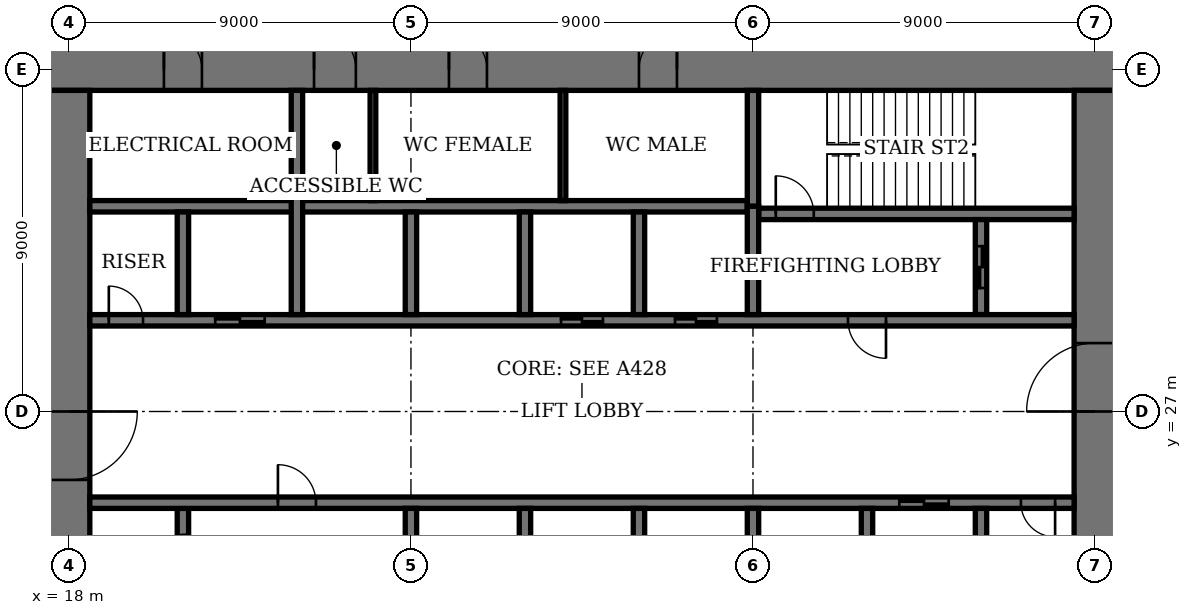
"""IFC4 building model, lengths in metres.
Left out: names, types, materials, properties, quantities, classifications, styles, units other than length and angle.
Written with IfcOpenShell. Run it as: python <this file> out.ifc"""

import sys

from ifc_helpers import new_model, si_unit, direction, frame, frame_2d, origin, place, context, subcontext, project, spatial, rectangle, extrude, element, fill, save


model = new_model("IFC4")
c1 = context("Model", 3, precision=1e-05, world=origin(), true_north=direction((0.0, 1.0)))
c2 = subcontext(c1, "Body", "Model", "MODEL_VIEW")
j1 = project(units=[si_unit("LENGTHUNIT", "METRE"), si_unit("PLANEANGLEUNIT", "RADIAN")], contexts=[c1])
p1 = place(None, origin())
s1 = spatial("IfcSite", under=j1, at=p1, CompositionType="ELEMENT")
p2 = place(p1, origin())
s2 = spatial("IfcBuilding", under=s1, at=p2, CompositionType="ELEMENT")
p3 = place(p2, frame((0.0, 0.0, 101.0)))
s3 = spatial("IfcBuildingStorey", under=s2, at=p3, CompositionType="ELEMENT", Elevation=101.0)
p4 = place(p3, frame((45.55, 36.0, 0.0), z_axis=(0.0, 0.0, 1.0), x_axis=(-1.0, 0.0, 0.0)))
e1 = element("IfcWall", 1, at=p4, inside=s3, PredefinedType="SHEAR", context=c2, shape_type="SweptSolid", body=[
    extrude(rectangle(XDim=28.1, YDim=1.1, at=frame_2d((14.05, 0.0))), origin(), (0.0, 0.0, 1.0), 4.0),
])
p5 = place(p4, frame((11.55, 0.0, 0.0)))
e2 = element("IfcOpeningElement", 2, at=p5, cuts=e1, PredefinedType="OPENING", context=c2, shape_type="SweptSolid", body=[
    extrude(rectangle(XDim=1.0, YDim=2.4, at=frame_2d((0.5, 1.2))), frame((0.0, 0.56, 0.0), z_axis=(0.0, -1.0, 0.0), x_axis=(1.0, 0.0, 0.0)), (0.0, 0.0, 1.0), 1.12),
])
p6 = place(p4, frame((16.55, 0.0, 0.0)))
e3 = element("IfcOpeningElement", 3, at=p6, cuts=e1, PredefinedType="OPENING", context=c2, shape_type="SweptSolid", body=[
    extrude(rectangle(XDim=1.0, YDim=2.4, at=frame_2d((0.5, 1.2))), frame((0.0, 0.56, 0.0), z_axis=(0.0, -1.0, 0.0), x_axis=(1.0, 0.0, 0.0)), (0.0, 0.0, 1.0), 1.12),
])
p7 = place(p4, frame((20.0, 0.0, 0.0)))
e4 = element("IfcOpeningElement", 4, at=p7, cuts=e1, PredefinedType="OPENING", context=c2, shape_type="SweptSolid", body=[
    extrude(rectangle(XDim=1.1, YDim=2.4, at=frame_2d((0.55, 1.2))), frame((0.0, 0.56, 0.0), z_axis=(0.0, -1.0, 0.0), x_axis=(1.0, 0.0, 0.0)), (0.0, 0.0, 1.0), 1.12),
])
p8 = place(p4, frame((24.05, 0.0, 0.0)))
e5 = element("IfcOpeningElement", 5, at=p8, cuts=e1, PredefinedType="OPENING", context=c2, shape_type="SweptSolid", body=[
    extrude(rectangle(XDim=1.0, YDim=2.4, at=frame_2d((0.5, 1.2))), frame((0.0, 0.56, 0.0), z_axis=(0.0, -1.0, 0.0), x_axis=(1.0, 0.0, 0.0)), (0.0, 0.0, 1.0), 1.12),
])
p9 = place(p3, frame((18.0, 35.45, 0.0), z_axis=(0.0, 0.0, 1.0), x_axis=(0.0, -1.0, 0.0)))
e6 = element("IfcWall", 6, at=p9, inside=s3, PredefinedType="SHEAR", context=c2, shape_type="SweptSolid", body=[
    extrude(rectangle(XDim=16.9, YDim=1.1, at=frame_2d((8.45, 0.0))), origin(), (0.0, 0.0, 1.0), 4.0),
])
p10 = place(p9, frame((8.45, 0.0, 0.0)))
e7 = element("IfcOpeningElement", 7, at=p10, cuts=e6, PredefinedType="OPENING", context=c2, shape_type="SweptSolid", body=[
    extrude(rectangle(XDim=1.8, YDim=2.4, at=frame_2d((0.9, 1.2))), frame((0.0, 0.56, 0.0), z_axis=(0.0, -1.0, 0.0), x_axis=(1.0, 0.0, 0.0)), (0.0, 0.0, 1.0), 1.12),
])
p11 = place(p3, frame((45.0, 18.55, 0.0), z_axis=(0.0, 0.0, 1.0), x_axis=(0.0, 1.0, 0.0)))
e8 = element("IfcWall", 8, at=p11, inside=s3, PredefinedType="SHEAR", context=c2, shape_type="SweptSolid", body=[
    extrude(rectangle(XDim=16.9, YDim=1.1, at=frame_2d((8.45, 0.0))), origin(), (0.0, 0.0, 1.0), 4.0),
])
p12 = place(p11, frame((8.45, 0.0, 0.0)))
e9 = element("IfcOpeningElement", 9, at=p12, cuts=e8, PredefinedType="OPENING", context=c2, shape_type="SweptSolid", body=[
    extrude(rectangle(XDim=1.8, YDim=2.4, at=frame_2d((0.9, 1.2))), frame((0.0, 0.56, 0.0), z_axis=(0.0, -1.0, 0.0), x_axis=(1.0, 0.0, 0.0)), (0.0, 0.0, 1.0), 1.12),
])
p13 = place(p3, frame((36.15, 32.2, 0.0), z_axis=(0.0, 0.0, 1.0), x_axis=(1.0, 0.0, 0.0)))
e10 = element("IfcWall", 10, at=p13, inside=s3, PredefinedType="SHEAR", context=c2, shape_type="SweptSolid", body=[
    extrude(rectangle(XDim=8.3, YDim=0.3, at=frame_2d((4.15, 0.0))), origin(), (0.0, 0.0, 1.0), 4.0),
])
p14 = place(p13, frame((0.45, 0.0, 0.0)))
e11 = element("IfcOpeningElement", 11, at=p14, cuts=e10, PredefinedType="OPENING", context=c2, shape_type="SweptSolid", body=[
    extrude(rectangle(XDim=1.0, YDim=2.4, at=frame_2d((0.5, 1.2))), frame((0.0, 0.16, 0.0), z_axis=(0.0, -1.0, 0.0), x_axis=(1.0, 0.0, 0.0)), (0.0, 0.0, 1.0), 0.32),
])
p15 = place(p3, frame((36.0, 32.4, 0.0), z_axis=(0.0, 0.0, 1.0), x_axis=(0.0, 1.0, 0.0)))
e12 = element("IfcWall", 12, at=p15, inside=s3, PredefinedType="SHEAR", context=c2, shape_type="SweptSolid", body=[
    extrude(rectangle(XDim=3.05, YDim=0.3, at=frame_2d((1.525, 0.0))), origin(), (0.0, 0.0, 1.0), 4.0),
])
p16 = place(p3, frame((21.0, 21.95, 0.0), z_axis=(0.0, 0.0, 1.0), x_axis=(0.0, 1.0, 0.0)))
e13 = element("IfcWall", 13, at=p16, inside=s3, PredefinedType="SHEAR", context=c2, shape_type="SweptSolid", body=[
    extrude(rectangle(XDim=2.5, YDim=0.3, at=frame_2d((1.25, 0.0))), origin(), (0.0, 0.0, 1.0), 4.0),
])
p17 = place(p16, frame((0.7, 0.0, 0.0)))
e14 = element("IfcOpeningElement", 14, at=p17, cuts=e13, PredefinedType="OPENING", context=c2, shape_type="SweptSolid", body=[
    extrude(rectangle(XDim=1.1, YDim=2.4, at=frame_2d((0.55, 1.2))), frame((0.0, 0.16, 0.0), z_axis=(0.0, -1.0, 0.0), x_axis=(1.0, 0.0, 0.0)), (0.0, 0.0, 1.0), 0.32),
])
p18 = place(p3, frame((42.0, 29.55, 0.0), z_axis=(0.0, 0.0, 1.0), x_axis=(0.0, 1.0, 0.0)))
e15 = element("IfcWall", 15, at=p18, inside=s3, PredefinedType="SHEAR", context=c2, shape_type="SweptSolid", body=[
    extrude(rectangle(XDim=2.5, YDim=0.3, at=frame_2d((1.25, 0.0))), origin(), (0.0, 0.0, 1.0), 4.0),
])
p19 = place(p18, frame((0.7, 0.0, 0.0)))
e16 = element("IfcOpeningElement", 16, at=p19, cuts=e15, PredefinedType="OPENING", context=c2, shape_type="SweptSolid", body=[
    extrude(rectangle(XDim=1.1, YDim=2.4, at=frame_2d((0.55, 1.2))), frame((0.0, 0.16, 0.0), z_axis=(0.0, -1.0, 0.0), x_axis=(1.0, 0.0, 0.0)), (0.0, 0.0, 1.0), 0.32),
])
p20 = place(p3, frame((18.55, 24.6, 0.0), z_axis=(0.0, 0.0, 1.0), x_axis=(1.0, 0.0, 0.0)))
e17 = element("IfcWall", 17, at=p20, inside=s3, PredefinedType="SHEAR", context=c2, shape_type="SweptSolid", body=[
    extrude(rectangle(XDim=25.9, YDim=0.3, at=frame_2d((12.95, 0.0))), origin(), (0.0, 0.0, 1.0), 4.0),
])
p21 = place(p20, frame((4.95, 0.0, 0.0)))
e18 = element("IfcOpeningElement", 18, at=p21, cuts=e17, PredefinedType="OPENING", context=c2, shape_type="SweptSolid", body=[
    extrude(rectangle(XDim=1.0, YDim=2.4, at=frame_2d((0.5, 1.2))), frame((0.0, 0.16, 0.0), z_axis=(0.0, -1.0, 0.0), x_axis=(1.0, 0.0, 0.0)), (0.0, 0.0, 1.0), 0.32),
])
p22 = place(p20, frame((24.5, 0.0, 0.0)))
e19 = element("IfcOpeningElement", 19, at=p22, cuts=e17, PredefinedType="OPENING", context=c2, shape_type="SweptSolid", body=[
    extrude(rectangle(XDim=0.9, YDim=2.1, at=frame_2d((0.45, 1.05))), frame((0.0, 0.16, 0.0), z_axis=(0.0, -1.0, 0.0), x_axis=(1.0, 0.0, 0.0)), (0.0, 0.0, 1.0), 0.32),
])
p23 = place(p20, frame((21.3, 0.0, 0.0)))
e20 = element("IfcOpeningElement", 20, at=p23, cuts=e17, PredefinedType="OPENING", context=c2, shape_type="SweptSolid", body=[
    extrude(rectangle(XDim=1.3, YDim=2.4, at=frame_2d((0.65, 1.2))), frame((0.0, 0.16, 0.0), z_axis=(0.0, -1.0, 0.0), x_axis=(1.0, 0.0, 0.0)), (0.0, 0.0, 1.0), 0.32),
])
p24 = place(p3, frame((18.55, 29.4, 0.0), z_axis=(0.0, 0.0, 1.0), x_axis=(1.0, 0.0, 0.0)))
e21 = element("IfcWall", 21, at=p24, inside=s3, PredefinedType="SHEAR", context=c2, shape_type="SweptSolid", body=[
    extrude(rectangle(XDim=25.9, YDim=0.3, at=frame_2d((12.95, 0.0))), origin(), (0.0, 0.0, 1.0), 4.0),
])
p25 = place(p24, frame((19.95, 0.0, 0.0)))
e22 = element("IfcOpeningElement", 22, at=p25, cuts=e21, PredefinedType="OPENING", context=c2, shape_type="SweptSolid", body=[
    extrude(rectangle(XDim=1.0, YDim=2.4, at=frame_2d((0.5, 1.2))), frame((0.0, 0.16, 0.0), z_axis=(0.0, -1.0, 0.0), x_axis=(1.0, 0.0, 0.0)), (0.0, 0.0, 1.0), 0.32),
])
p26 = place(p24, frame((0.5, 0.0, 0.0)))
e23 = element("IfcOpeningElement", 23, at=p26, cuts=e21, PredefinedType="OPENING", context=c2, shape_type="SweptSolid", body=[
    extrude(rectangle(XDim=0.9, YDim=2.1, at=frame_2d((0.45, 1.05))), frame((0.0, 0.16, 0.0), z_axis=(0.0, -1.0, 0.0), x_axis=(1.0, 0.0, 0.0)), (0.0, 0.0, 1.0), 0.32),
])
p27 = place(p24, frame((15.4, 0.0, 0.0)))
e24 = element("IfcOpeningElement", 24, at=p27, cuts=e21, PredefinedType="OPENING", context=c2, shape_type="SweptSolid", body=[
    extrude(rectangle(XDim=1.1, YDim=2.4, at=frame_2d((0.55, 1.2))), frame((0.0, 0.16, 0.0), z_axis=(0.0, -1.0, 0.0), x_axis=(1.0, 0.0, 0.0)), (0.0, 0.0, 1.0), 0.32),
])
p28 = place(p24, frame((12.4, 0.0, 0.0)))
e25 = element("IfcOpeningElement", 25, at=p28, cuts=e21, PredefinedType="OPENING", context=c2, shape_type="SweptSolid", body=[
    extrude(rectangle(XDim=1.1, YDim=2.4, at=frame_2d((0.55, 1.2))), frame((0.0, 0.16, 0.0), z_axis=(0.0, -1.0, 0.0), x_axis=(1.0, 0.0, 0.0)), (0.0, 0.0, 1.0), 0.32),
])
p29 = place(p24, frame((3.3, 0.0, 0.0)))
e26 = element("IfcOpeningElement", 26, at=p29, cuts=e21, PredefinedType="OPENING", context=c2, shape_type="SweptSolid", body=[
    extrude(rectangle(XDim=1.3, YDim=2.4, at=frame_2d((0.65, 1.2))), frame((0.0, 0.16, 0.0), z_axis=(0.0, -1.0, 0.0), x_axis=(1.0, 0.0, 0.0)), (0.0, 0.0, 1.0), 0.32),
])
p30 = place(p3, frame((18.55, 32.4, 0.0), z_axis=(0.0, 0.0, 1.0), x_axis=(1.0, 0.0, 0.0)))
e27 = element("IfcWall", 27, at=p30, inside=s3, PredefinedType="SHEAR", context=c2, shape_type="SweptSolid", body=[
    extrude(rectangle(XDim=17.3, YDim=0.3, at=frame_2d((8.65, 0.0))), origin(), (0.0, 0.0, 1.0), 4.0),
])
for number, where, z_axis, x_axis in (
    (28, (30.0, 21.75, 0.0), (0.0, 0.0, 1.0), (0.0, 1.0, 0.0)),
    (29, (33.0, 29.55, 0.0), (0.0, 0.0, 1.0), (0.0, 1.0, 0.0)),
    (30, (33.0, 21.75, 0.0), (0.0, 0.0, 1.0), (0.0, 1.0, 0.0)),
    (31, (30.0, 29.55, 0.0), (0.0, 0.0, 1.0), (0.0, 1.0, 0.0)),
    (32, (36.0, 21.75, 0.0), (0.0, 0.0, 1.0), (0.0, 1.0, 0.0)),
    (33, (27.0, 29.55, 0.0), (0.0, 0.0, 1.0), (0.0, 1.0, 0.0)),
):
    element("IfcWall", number, at=place(p3, frame(where, z_axis=z_axis, x_axis=x_axis)), inside=s3, PredefinedType="SHEAR", context=c2, shape_type="SweptSolid", body=[
        extrude(rectangle(XDim=2.7, YDim=0.3, at=frame_2d((1.35, 0.0))), origin(), (0.0, 0.0, 1.0), 4.0),
    ])
for number, where, z_axis, x_axis in (
    (34, (39.0, 18.55, 0.0), (0.0, 0.0, 1.0), (0.0, 1.0, 0.0)),
    (35, (24.0, 29.55, 0.0), (0.0, 0.0, 1.0), (0.0, 1.0, 0.0)),
):
    element("IfcWall", number, at=place(p3, frame(where, z_axis=z_axis, x_axis=x_axis)), inside=s3, PredefinedType="SHEAR", context=c2, shape_type="SweptSolid", body=[
        extrude(rectangle(XDim=5.9, YDim=0.3, at=frame_2d((2.95, 0.0))), origin(), (0.0, 0.0, 1.0), 4.0),
    ])
for number, where, z_axis, x_axis in (
    (36, (42.0, 21.75, 0.0), (0.0, 0.0, 1.0), (0.0, 1.0, 0.0)),
    (37, (21.0, 29.55, 0.0), (0.0, 0.0, 1.0), (0.0, 1.0, 0.0)),
):
    element("IfcWall", number, at=place(p3, frame(where, z_axis=z_axis, x_axis=x_axis)), inside=s3, PredefinedType="SHEAR", context=c2, shape_type="SweptSolid", body=[
        extrude(rectangle(XDim=2.7, YDim=0.3, at=frame_2d((1.35, 0.0))), origin(), (0.0, 0.0, 1.0), 4.0),
    ])
for number, where, z_axis, x_axis in (
    (38, (27.0, 21.6, 0.0), (0.0, 0.0, 1.0), (0.0, 1.0, 0.0)),
    (39, (36.0, 29.55, 0.0), (0.0, 0.0, 1.0), (0.0, 1.0, 0.0)),
):
    element("IfcWall", number, at=place(p3, frame(where, z_axis=z_axis, x_axis=x_axis)), inside=s3, PredefinedType="SHEAR", context=c2, shape_type="SweptSolid", body=[
        extrude(rectangle(XDim=2.85, YDim=0.3, at=frame_2d((1.425, 0.0))), origin(), (0.0, 0.0, 1.0), 4.0),
    ])
for number, where, z_axis, x_axis in (
    (40, (31.0, 32.55, 0.0), (0.0, 0.0, 1.0), (0.0, 1.0, 0.0)),
    (41, (26.0, 32.55, 0.0), (0.0, 0.0, 1.0), (0.0, 1.0, 0.0)),
):
    element("IfcWall", number, at=place(p3, frame(where, z_axis=z_axis, x_axis=x_axis)), inside=s3, PredefinedType="PARTITIONING", context=c2, shape_type="SweptSolid", body=[
        extrude(rectangle(XDim=2.9, YDim=0.15, at=frame_2d((1.45, 0.0))), origin(), (0.0, 0.0, 1.0), 3.75),
    ])
p31 = place(p10, origin())
e42 = element("IfcDoor", 42, at=p31, inside=s3, OperationType="DOUBLE_DOOR_DOUBLE_SWING", PredefinedType="DOOR", context=c2, shape_type="SweptSolid", body=[
    extrude(rectangle(XDim=1.8, YDim=2.4, at=frame_2d((0.9, 1.2))), frame((0.0, 0.03, 0.0), z_axis=(0.0, -1.0, 0.0), x_axis=(1.0, 0.0, 0.0)), (0.0, 0.0, 1.0), 0.06),
    extrude(rectangle(XDim=0.04, YDim=2.4, at=frame_2d((0.02, 1.2))), frame((0.0, 0.55, 0.0), z_axis=(0.0, -1.0, 0.0), x_axis=(1.0, 0.0, 0.0)), (0.0, 0.0, 1.0), 1.1),
    extrude(rectangle(XDim=0.04, YDim=2.4, at=frame_2d((1.78, 1.2))), frame((0.0, 0.55, 0.0), z_axis=(0.0, -1.0, 0.0), x_axis=(1.0, 0.0, 0.0)), (0.0, 0.0, 1.0), 1.1),
    extrude(rectangle(XDim=1.8, YDim=0.04, at=frame_2d((0.9, 2.38))), frame((0.0, 0.55, 0.0), z_axis=(0.0, -1.0, 0.0), x_axis=(1.0, 0.0, 0.0)), (0.0, 0.0, 1.0), 1.1),
])
fill(e7, e42)
p32 = place(p12, origin())
e43 = element("IfcDoor", 43, at=p32, inside=s3, OperationType="DOUBLE_DOOR_DOUBLE_SWING", PredefinedType="DOOR", context=c2, shape_type="SweptSolid", body=[
    extrude(rectangle(XDim=1.8, YDim=2.4, at=frame_2d((0.9, 1.2))), frame((0.0, 0.03, 0.0), z_axis=(0.0, -1.0, 0.0), x_axis=(1.0, 0.0, 0.0)), (0.0, 0.0, 1.0), 0.06),
    extrude(rectangle(XDim=0.04, YDim=2.4, at=frame_2d((0.02, 1.2))), frame((0.0, 0.55, 0.0), z_axis=(0.0, -1.0, 0.0), x_axis=(1.0, 0.0, 0.0)), (0.0, 0.0, 1.0), 1.1),
    extrude(rectangle(XDim=0.04, YDim=2.4, at=frame_2d((1.78, 1.2))), frame((0.0, 0.55, 0.0), z_axis=(0.0, -1.0, 0.0), x_axis=(1.0, 0.0, 0.0)), (0.0, 0.0, 1.0), 1.1),
    extrude(rectangle(XDim=1.8, YDim=0.04, at=frame_2d((0.9, 2.38))), frame((0.0, 0.55, 0.0), z_axis=(0.0, -1.0, 0.0), x_axis=(1.0, 0.0, 0.0)), (0.0, 0.0, 1.0), 1.1),
])
fill(e9, e43)
p33 = place(p5, origin())
e44 = element("IfcDoor", 44, at=p33, inside=s3, OperationType="SINGLE_SWING_LEFT", PredefinedType="DOOR", context=c2, shape_type="SweptSolid", body=[
    extrude(rectangle(XDim=1.0, YDim=2.4, at=frame_2d((0.5, 1.2))), frame((0.0, 0.025, 0.0), z_axis=(0.0, -1.0, 0.0), x_axis=(1.0, 0.0, 0.0)), (0.0, 0.0, 1.0), 0.05),
    extrude(rectangle(XDim=0.04, YDim=2.4, at=frame_2d((0.02, 1.2))), frame((0.0, 0.4, 0.0), z_axis=(0.0, -1.0, 0.0), x_axis=(1.0, 0.0, 0.0)), (0.0, 0.0, 1.0), 0.8),
    extrude(rectangle(XDim=0.04, YDim=2.4, at=frame_2d((0.98, 1.2))), frame((0.0, 0.4, 0.0), z_axis=(0.0, -1.0, 0.0), x_axis=(1.0, 0.0, 0.0)), (0.0, 0.0, 1.0), 0.8),
    extrude(rectangle(XDim=1.0, YDim=0.04, at=frame_2d((0.5, 2.38))), frame((0.0, 0.4, 0.0), z_axis=(0.0, -1.0, 0.0), x_axis=(1.0, 0.0, 0.0)), (0.0, 0.0, 1.0), 0.8),
])
fill(e2, e44)
p34 = place(p6, origin())
e45 = element("IfcDoor", 45, at=p34, inside=s3, OperationType="SINGLE_SWING_RIGHT", PredefinedType="DOOR", context=c2, shape_type="SweptSolid", body=[
    extrude(rectangle(XDim=1.0, YDim=2.4, at=frame_2d((0.5, 1.2))), frame((0.0, 0.025, 0.0), z_axis=(0.0, -1.0, 0.0), x_axis=(1.0, 0.0, 0.0)), (0.0, 0.0, 1.0), 0.05),
    extrude(rectangle(XDim=0.04, YDim=2.4, at=frame_2d((0.02, 1.2))), frame((0.0, 0.4, 0.0), z_axis=(0.0, -1.0, 0.0), x_axis=(1.0, 0.0, 0.0)), (0.0, 0.0, 1.0), 0.8),
    extrude(rectangle(XDim=0.04, YDim=2.4, at=frame_2d((0.98, 1.2))), frame((0.0, 0.4, 0.0), z_axis=(0.0, -1.0, 0.0), x_axis=(1.0, 0.0, 0.0)), (0.0, 0.0, 1.0), 0.8),
    extrude(rectangle(XDim=1.0, YDim=0.04, at=frame_2d((0.5, 2.38))), frame((0.0, 0.4, 0.0), z_axis=(0.0, -1.0, 0.0), x_axis=(1.0, 0.0, 0.0)), (0.0, 0.0, 1.0), 0.8),
])
fill(e3, e45)
p35 = place(p7, origin())
e46 = element("IfcDoor", 46, at=p35, inside=s3, OperationType="SINGLE_SWING_RIGHT", PredefinedType="DOOR", context=c2, shape_type="SweptSolid", body=[
    extrude(rectangle(XDim=1.1, YDim=2.4, at=frame_2d((0.55, 1.2))), frame((0.0, 0.025, 0.0), z_axis=(0.0, -1.0, 0.0), x_axis=(1.0, 0.0, 0.0)), (0.0, 0.0, 1.0), 0.05),
    extrude(rectangle(XDim=0.04, YDim=2.4, at=frame_2d((0.02, 1.2))), frame((0.0, 0.44, 0.0), z_axis=(0.0, -1.0, 0.0), x_axis=(1.0, 0.0, 0.0)), (0.0, 0.0, 1.0), 0.88),
    extrude(rectangle(XDim=0.04, YDim=2.4, at=frame_2d((1.08, 1.2))), frame((0.0, 0.44, 0.0), z_axis=(0.0, -1.0, 0.0), x_axis=(1.0, 0.0, 0.0)), (0.0, 0.0, 1.0), 0.88),
    extrude(rectangle(XDim=1.1, YDim=0.04, at=frame_2d((0.55, 2.38))), frame((0.0, 0.44, 0.0), z_axis=(0.0, -1.0, 0.0), x_axis=(1.0, 0.0, 0.0)), (0.0, 0.0, 1.0), 0.88),
])
fill(e4, e46)
p36 = place(p8, origin())
e47 = element("IfcDoor", 47, at=p36, inside=s3, OperationType="SINGLE_SWING_RIGHT", PredefinedType="DOOR", context=c2, shape_type="SweptSolid", body=[
    extrude(rectangle(XDim=1.0, YDim=2.4, at=frame_2d((0.5, 1.2))), frame((0.0, 0.025, 0.0), z_axis=(0.0, -1.0, 0.0), x_axis=(1.0, 0.0, 0.0)), (0.0, 0.0, 1.0), 0.05),
    extrude(rectangle(XDim=0.04, YDim=2.4, at=frame_2d((0.02, 1.2))), frame((0.0, 0.4, 0.0), z_axis=(0.0, -1.0, 0.0), x_axis=(1.0, 0.0, 0.0)), (0.0, 0.0, 1.0), 0.8),
    extrude(rectangle(XDim=0.04, YDim=2.4, at=frame_2d((0.98, 1.2))), frame((0.0, 0.4, 0.0), z_axis=(0.0, -1.0, 0.0), x_axis=(1.0, 0.0, 0.0)), (0.0, 0.0, 1.0), 0.8),
    extrude(rectangle(XDim=1.0, YDim=0.04, at=frame_2d((0.5, 2.38))), frame((0.0, 0.4, 0.0), z_axis=(0.0, -1.0, 0.0), x_axis=(1.0, 0.0, 0.0)), (0.0, 0.0, 1.0), 0.8),
])
fill(e5, e47)
p37 = place(p14, origin())
e48 = element("IfcDoor", 48, at=p37, inside=s3, OperationType="SINGLE_SWING_RIGHT", PredefinedType="DOOR", context=c2, shape_type="SweptSolid", body=[
    extrude(rectangle(XDim=1.0, YDim=2.4, at=frame_2d((0.5, 1.2))), frame((0.0, 0.03, 0.0), z_axis=(0.0, -1.0, 0.0), x_axis=(1.0, 0.0, 0.0)), (0.0, 0.0, 1.0), 0.06),
])
fill(e11, e48)
p38 = place(p21, origin())
e49 = element("IfcDoor", 49, at=p38, inside=s3, OperationType="SINGLE_SWING_RIGHT", PredefinedType="DOOR", context=c2, shape_type="SweptSolid", body=[
    extrude(rectangle(XDim=1.0, YDim=2.4, at=frame_2d((0.5, 1.2))), frame((0.0, 0.03, 0.0), z_axis=(0.0, -1.0, 0.0), x_axis=(1.0, 0.0, 0.0)), (0.0, 0.0, 1.0), 0.06),
])
fill(e18, e49)
p39 = place(p25, origin())
e50 = element("IfcDoor", 50, at=p39, inside=s3, OperationType="SINGLE_SWING_RIGHT", PredefinedType="DOOR", context=c2, shape_type="SweptSolid", body=[
    extrude(rectangle(XDim=1.0, YDim=2.4, at=frame_2d((0.5, 1.2))), frame((0.0, 0.03, 0.0), z_axis=(0.0, -1.0, 0.0), x_axis=(1.0, 0.0, 0.0)), (0.0, 0.0, 1.0), 0.06),
])
fill(e22, e50)
p40 = place(p22, origin())
e51 = element("IfcDoor", 51, at=p40, inside=s3, OperationType="SINGLE_SWING_RIGHT", PredefinedType="DOOR", context=c2, shape_type="SweptSolid", body=[
    extrude(rectangle(XDim=0.9, YDim=2.1, at=frame_2d((0.45, 1.05))), frame((0.0, 0.03, 0.0), z_axis=(0.0, -1.0, 0.0), x_axis=(1.0, 0.0, 0.0)), (0.0, 0.0, 1.0), 0.06),
])
fill(e19, e51)
p41 = place(p26, origin())
e52 = element("IfcDoor", 52, at=p41, inside=s3, OperationType="SINGLE_SWING_RIGHT", PredefinedType="DOOR", context=c2, shape_type="SweptSolid", body=[
    extrude(rectangle(XDim=0.9, YDim=2.1, at=frame_2d((0.45, 1.05))), frame((0.0, 0.03, 0.0), z_axis=(0.0, -1.0, 0.0), x_axis=(1.0, 0.0, 0.0)), (0.0, 0.0, 1.0), 0.06),
])
fill(e23, e52)
p42 = place(p27, origin())
e53 = element("IfcDoor", 53, at=p42, inside=s3, OperationType="DOUBLE_DOOR_SLIDING", PredefinedType="DOOR", context=c2, shape_type="SweptSolid", body=[
    extrude(rectangle(XDim=1.1, YDim=2.4, at=frame_2d((0.55, 1.2))), frame((0.0, 0.02, 0.0), z_axis=(0.0, -1.0, 0.0), x_axis=(1.0, 0.0, 0.0)), (0.0, 0.0, 1.0), 0.04),
])
fill(e24, e53)
p43 = place(p28, origin())
e54 = element("IfcDoor", 54, at=p43, inside=s3, OperationType="DOUBLE_DOOR_SLIDING", PredefinedType="DOOR", context=c2, shape_type="SweptSolid", body=[
    extrude(rectangle(XDim=1.1, YDim=2.4, at=frame_2d((0.55, 1.2))), frame((0.0, 0.02, 0.0), z_axis=(0.0, -1.0, 0.0), x_axis=(1.0, 0.0, 0.0)), (0.0, 0.0, 1.0), 0.04),
])
fill(e25, e54)
p44 = place(p23, origin())
e55 = element("IfcDoor", 55, at=p44, inside=s3, OperationType="DOUBLE_DOOR_SLIDING", PredefinedType="DOOR", context=c2, shape_type="SweptSolid", body=[
    extrude(rectangle(XDim=1.3, YDim=2.4, at=frame_2d((0.65, 1.2))), frame((0.0, 0.02, 0.0), z_axis=(0.0, -1.0, 0.0), x_axis=(1.0, 0.0, 0.0)), (0.0, 0.0, 1.0), 0.04),
])
fill(e20, e55)
p45 = place(p29, origin())
e56 = element("IfcDoor", 56, at=p45, inside=s3, OperationType="DOUBLE_DOOR_SLIDING", PredefinedType="DOOR", context=c2, shape_type="SweptSolid", body=[
    extrude(rectangle(XDim=1.3, YDim=2.4, at=frame_2d((0.65, 1.2))), frame((0.0, 0.02, 0.0), z_axis=(0.0, -1.0, 0.0), x_axis=(1.0, 0.0, 0.0)), (0.0, 0.0, 1.0), 0.04),
])
fill(e26, e56)
p46 = place(p19, origin())
e57 = element("IfcDoor", 57, at=p46, inside=s3, OperationType="DOUBLE_DOOR_SLIDING", PredefinedType="DOOR", context=c2, shape_type="SweptSolid", body=[
    extrude(rectangle(XDim=1.1, YDim=2.4, at=frame_2d((0.55, 1.2))), frame((0.0, 0.03, 0.0), z_axis=(0.0, -1.0, 0.0), x_axis=(1.0, 0.0, 0.0)), (0.0, 0.0, 1.0), 0.06),
])
fill(e16, e57)
save(model, sys.argv[1])
